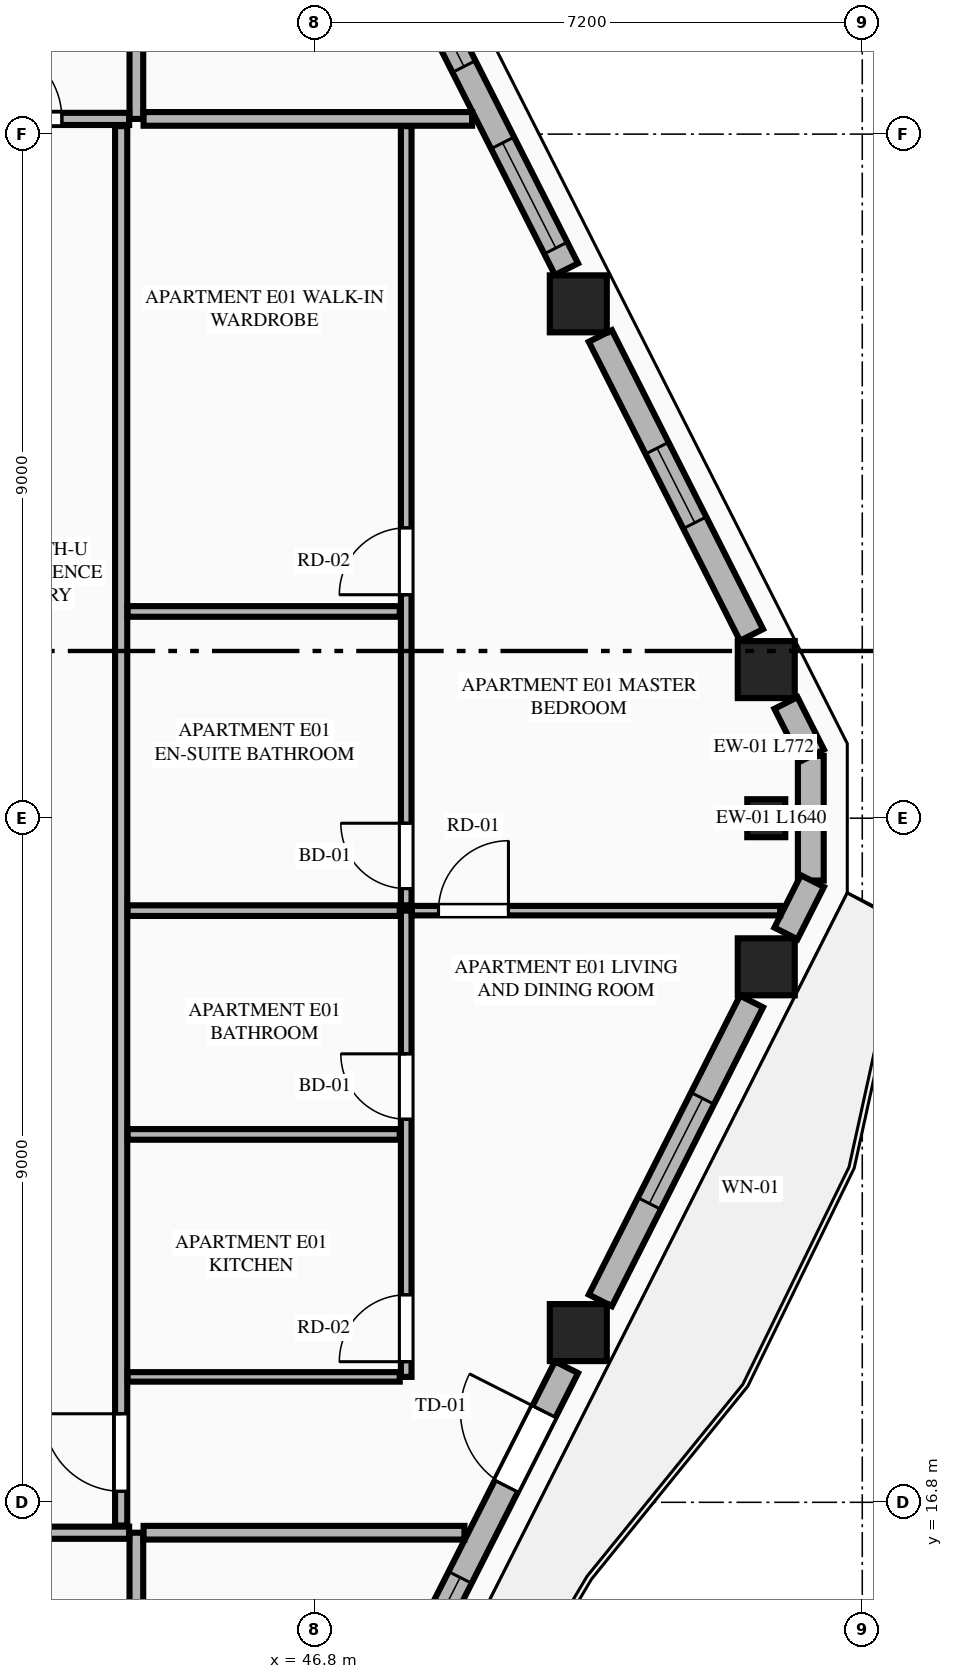
"""IFC4 building model, lengths in metres.
Left out: names, types, materials, properties, quantities, classifications, styles, units other than length and angle.
Written with IfcOpenShell. Run it as: python <this file> out.ifc"""

import sys

from ifc_helpers import new_model, si_unit, direction, frame, frame_2d, origin, origin_2d, place, context, subcontext, project, spatial, rectangle, extrude, element, fill, save


model = new_model("IFC4")
c1 = context("Model", 3, precision=1e-05, world=origin(), true_north=direction((0.0, 1.0)))
c2 = subcontext(c1, "Body", "Model", "MODEL_VIEW")
j1 = project(units=[si_unit("LENGTHUNIT", "METRE"), si_unit("PLANEANGLEUNIT", "RADIAN")], contexts=[c1])
p1 = place(None, origin())
s1 = spatial("IfcSite", under=j1, at=p1, CompositionType="ELEMENT")
p2 = place(p1, origin())
s2 = spatial("IfcBuilding", under=s1, at=p2, CompositionType="ELEMENT")
p3 = place(p2, frame((0.0, 0.0, 230.65)))
s3 = spatial("IfcBuildingStorey", under=s2, at=p3, CompositionType="ELEMENT", Elevation=230.65)
for number, where, z_axis, x_axis in (
    (1, (50.264, 19.033, 0.0), (0.0, 0.0, 1.0), (1.0, 0.0, 0.0)),
    (2, (52.737, 23.845, 0.0), (0.0, 0.0, 1.0), (1.0, 0.0, 0.0)),
    (3, (52.737, 27.755, 0.0), (0.0, 0.0, 1.0), (1.0, 0.0, 0.0)),
    (4, (50.264, 32.567, 0.0), (0.0, 0.0, 1.0), (1.0, 0.0, 0.0)),
):
    element("IfcColumn", number, at=place(p3, frame(where, z_axis=z_axis, x_axis=x_axis)), inside=s3, PredefinedType="COLUMN", context=c2, shape_type="SweptSolid", body=[
        extrude(rectangle(XDim=0.75, YDim=0.75, at=origin_2d()), origin(), (0.0, 0.0, 1.0), 3.65),
    ])
p4 = place(p3, frame((52.737, 25.8, 0.0), z_axis=(0.0, 0.0, 1.0), x_axis=(0.0, 1.0, 0.0)))
e5 = element("IfcColumn", 5, at=p4, inside=s3, PredefinedType="PILASTER", context=c2, shape_type="SweptSolid", body=[
    extrude(rectangle(XDim=0.5, YDim=0.35, at=origin_2d()), origin(), (0.0, 0.0, 1.0), 3.65),
])
p5 = place(p3, frame((53.323, 24.98, 0.0), z_axis=(0.0, 0.0, 1.0), x_axis=(0.0, 1.0, 0.0)))
e6 = element("IfcWall", 6, at=p5, inside=s3, PredefinedType="STANDARD", context=c2, shape_type="SweptSolid", body=[
    extrude(rectangle(XDim=1.64, YDim=0.34, at=frame_2d((0.82, 0.0))), origin(), (0.0, 0.0, 1.0), 3.45),
])
p6 = place(p3, frame((48.032, 14.473, 0.0), z_axis=(0.0, 0.0, 1.0), x_axis=(0.451539564999, 0.892251097641, 0.0)))
e7 = element("IfcWall", 7, at=p6, inside=s3, PredefinedType="STANDARD", context=c2, shape_type="SweptSolid", body=[
    extrude(rectangle(XDim=4.6, YDim=0.34, at=frame_2d((2.3, 0.0))), origin(), (0.0, 0.0, 1.0), 2.983),
])
p7 = place(p6, frame((2.846, 0.0, 0.0)))
e8 = element("IfcOpeningElement", 8, at=p7, cuts=e7, PredefinedType="OPENING", context=c2, shape_type="SweptSolid", body=[
    extrude(rectangle(XDim=1.1, YDim=2.25, at=frame_2d((0.55, 1.125))), frame((0.0, 0.18, 0.0), z_axis=(0.0, -1.0, 0.0), x_axis=(1.0, 0.0, 0.0)), (0.0, 0.0, 1.0), 0.36),
])
p8 = place(p6, frame((0.4, 0.0, 0.75)))
e9 = element("IfcOpeningElement", 9, at=p8, cuts=e7, PredefinedType="OPENING", context=c2, shape_type="SweptSolid", body=[
    extrude(rectangle(XDim=1.1, YDim=2.0, at=frame_2d((0.55, 1.0))), frame((0.0, 0.18, 0.0), z_axis=(0.0, -1.0, 0.0), x_axis=(1.0, 0.0, 0.0)), (0.0, 0.0, 1.0), 0.36),
])
p9 = place(p3, frame((50.554, 19.456, 0.0), z_axis=(0.0, 0.0, 1.0), x_axis=(0.45130817501, 0.892368158984, 0.0)))
e10 = element("IfcWall", 10, at=p9, inside=s3, PredefinedType="STANDARD", context=c2, shape_type="SweptSolid", body=[
    extrude(rectangle(XDim=4.407, YDim=0.34, at=frame_2d((2.204, 0.0))), origin(), (0.0, 0.0, 1.0), 2.983),
])
p10 = place(p9, frame((1.429, 0.0, 0.75)))
e11 = element("IfcOpeningElement", 11, at=p10, cuts=e10, PredefinedType="OPENING", context=c2, shape_type="SweptSolid", body=[
    extrude(rectangle(XDim=1.55, YDim=2.05, at=frame_2d((0.775, 1.025))), frame((0.0, 0.18, 0.0), z_axis=(0.0, -1.0, 0.0), x_axis=(1.0, 0.0, 0.0)), (0.0, 0.0, 1.0), 0.36),
])
for number, where, z_axis, x_axis in (
    (12, (52.996, 24.284, 0.0), (0.0, 0.0, 1.0), (0.451, 0.893, 0.0)),
    (13, (53.344, 26.627, 0.0), (0.0, 0.0, 1.0), (-0.451, 0.893, 0.0)),
):
    element("IfcWall", number, at=place(p3, frame(where, z_axis=z_axis, x_axis=x_axis)), inside=s3, PredefinedType="STANDARD", context=c2, shape_type="SweptSolid", body=[
        extrude(rectangle(XDim=0.772, YDim=0.34, at=frame_2d((0.386, 0.0))), origin(), (0.0, 0.0, 1.0), 3.45),
    ])
p11 = place(p3, frame((52.543, 28.211, 0.0), z_axis=(0.0, 0.0, 1.0), x_axis=(-0.451285866323, 0.892379441077, 0.0)))
e14 = element("IfcWall", 14, at=p11, inside=s3, PredefinedType="STANDARD", context=c2, shape_type="SweptSolid", body=[
    extrude(rectangle(XDim=4.407, YDim=0.34, at=frame_2d((2.204, 0.0))), origin(), (0.0, 0.0, 1.0), 2.983),
])
p12 = place(p11, frame((1.654, 0.0, 0.75)))
e15 = element("IfcOpeningElement", 15, at=p12, cuts=e14, PredefinedType="OPENING", context=c2, shape_type="SweptSolid", body=[
    extrude(rectangle(XDim=1.1, YDim=2.0, at=frame_2d((0.55, 1.0))), frame((0.0, 0.18, 0.0), z_axis=(0.0, -1.0, 0.0), x_axis=(1.0, 0.0, 0.0)), (0.0, 0.0, 1.0), 0.36),
])
p13 = place(p3, frame((50.109, 33.023, 0.0), z_axis=(0.0, 0.0, 1.0), x_axis=(-0.451539564999, 0.892251097641, 0.0)))
e16 = element("IfcWall", 16, at=p13, inside=s3, PredefinedType="STANDARD", context=c2, shape_type="SweptSolid", body=[
    extrude(rectangle(XDim=4.6, YDim=0.34, at=frame_2d((2.3, 0.0))), origin(), (0.0, 0.0, 1.0), 2.983),
])
p14 = place(p13, frame((0.312, 0.0, 0.75)))
e17 = element("IfcOpeningElement", 17, at=p14, cuts=e16, PredefinedType="OPENING", context=c2, shape_type="SweptSolid", body=[
    extrude(rectangle(XDim=1.55, YDim=2.05, at=frame_2d((0.775, 1.025))), frame((0.0, 0.18, 0.0), z_axis=(0.0, -1.0, 0.0), x_axis=(1.0, 0.0, 0.0)), (0.0, 0.0, 1.0), 0.36),
])
p15 = place(p13, frame((2.988, 0.0, 0.75)))
e18 = element("IfcOpeningElement", 18, at=p15, cuts=e16, PredefinedType="OPENING", context=c2, shape_type="SweptSolid", body=[
    extrude(rectangle(XDim=1.1, YDim=2.0, at=frame_2d((0.55, 1.0))), frame((0.0, 0.18, 0.0), z_axis=(0.0, -1.0, 0.0), x_axis=(1.0, 0.0, 0.0)), (0.0, 0.0, 1.0), 0.36),
])
p16 = place(p3, frame((44.45, 8.119, 0.0), z_axis=(0.0, 0.0, 1.0), x_axis=(0.0, 1.0, 0.0)))
e19 = element("IfcWall", 19, at=p16, inside=s3, PredefinedType="PARTITIONING", context=c2, shape_type="SweptSolid", body=[
    extrude(rectangle(XDim=8.281, YDim=0.18, at=frame_2d((4.141, 0.0))), origin(), (0.0, 0.0, 1.0), 3.45),
])
p17 = place(p3, frame((29.241, 16.4, 0.0), z_axis=(0.0, 0.0, 1.0), x_axis=(1.0, 0.0, 0.0)))
e20 = element("IfcWall", 20, at=p17, inside=s3, PredefinedType="PARTITIONING", context=c2, shape_type="SweptSolid", body=[
    extrude(rectangle(XDim=15.114, YDim=0.16, at=frame_2d((7.557, 0.0))), origin(), (0.0, 0.0, 1.0), 3.45),
])
p18 = place(p17, frame((12.909, 0.0, 0.0)))
e21 = element("IfcOpeningElement", 21, at=p18, cuts=e20, PredefinedType="OPENING", context=c2, shape_type="SweptSolid", body=[
    extrude(rectangle(XDim=1.02, YDim=2.25, at=frame_2d((0.51, 1.125))), frame((0.0, 0.09, 0.0), z_axis=(0.0, -1.0, 0.0), x_axis=(1.0, 0.0, 0.0)), (0.0, 0.0, 1.0), 0.18),
])
p19 = place(p3, frame((44.45, 35.0, 0.0), z_axis=(0.0, 0.0, 1.0), x_axis=(0.0, 1.0, 0.0)))
e22 = element("IfcWall", 22, at=p19, inside=s3, PredefinedType="PARTITIONING", context=c2, shape_type="SweptSolid", body=[
    extrude(rectangle(XDim=8.481, YDim=0.18, at=frame_2d((4.24, 0.0))), origin(), (0.0, 0.0, 1.0), 3.45),
])
p20 = place(p3, frame((29.241, 35.0, 0.0), z_axis=(0.0, 0.0, 1.0), x_axis=(1.0, 0.0, 0.0)))
e23 = element("IfcWall", 23, at=p20, inside=s3, PredefinedType="PARTITIONING", context=c2, shape_type="SweptSolid", body=[
    extrude(rectangle(XDim=15.114, YDim=0.16, at=frame_2d((7.557, 0.0))), origin(), (0.0, 0.0, 1.0), 3.45),
])
p21 = place(p20, frame((13.209, 0.0, 0.0)))
e24 = element("IfcOpeningElement", 24, at=p21, cuts=e23, PredefinedType="OPENING", context=c2, shape_type="SweptSolid", body=[
    extrude(rectangle(XDim=1.02, YDim=2.25, at=frame_2d((0.51, 1.125))), frame((0.0, 0.09, 0.0), z_axis=(0.0, -1.0, 0.0), x_axis=(1.0, 0.0, 0.0)), (0.0, 0.0, 1.0), 0.18),
])
p22 = place(p3, frame((44.545, 16.4, 0.0), z_axis=(0.0, 0.0, 1.0), x_axis=(1.0, 0.0, 0.0)))
e25 = element("IfcWall", 25, at=p22, inside=s3, PredefinedType="PARTITIONING", context=c2, shape_type="SweptSolid", body=[
    extrude(rectangle(XDim=4.221, YDim=0.18, at=frame_2d((2.111, 0.0))), origin(), (0.0, 0.0, 1.0), 3.45),
])
p23 = place(p3, frame((44.545, 35.0, 0.0), z_axis=(0.0, 0.0, 1.0), x_axis=(1.0, 0.0, 0.0)))
e26 = element("IfcWall", 26, at=p23, inside=s3, PredefinedType="PARTITIONING", context=c2, shape_type="SweptSolid", body=[
    extrude(rectangle(XDim=4.322, YDim=0.18, at=frame_2d((2.161, 0.0))), origin(), (0.0, 0.0, 1.0), 3.45),
])
p24 = place(p3, frame((44.25, 16.495, 0.0), z_axis=(0.0, 0.0, 1.0), x_axis=(0.0, 1.0, 0.0)))
e27 = element("IfcWall", 27, at=p24, inside=s3, PredefinedType="PARTITIONING", context=c2, shape_type="SweptSolid", body=[
    extrude(rectangle(XDim=18.41, YDim=0.16, at=frame_2d((9.205, 0.0))), origin(), (0.0, 0.0, 1.0), 3.137),
])
p25 = place(p24, frame((0.45, 0.0, 0.0)))
e28 = element("IfcOpeningElement", 28, at=p25, cuts=e27, PredefinedType="OPENING", context=c2, shape_type="SweptSolid", body=[
    extrude(rectangle(XDim=1.02, YDim=2.25, at=frame_2d((0.51, 1.125))), frame((0.0, 0.09, 0.0), z_axis=(0.0, -1.0, 0.0), x_axis=(1.0, 0.0, 0.0)), (0.0, 0.0, 1.0), 0.18),
])
p26 = place(p3, frame((44.335, 18.45, 0.0), z_axis=(0.0, 0.0, 1.0), x_axis=(1.0, 0.0, 0.0)))
e29 = element("IfcWall", 29, at=p26, inside=s3, PredefinedType="PARTITIONING", context=c2, shape_type="SweptSolid", body=[
    extrude(rectangle(XDim=3.58, YDim=0.125, at=frame_2d((1.79, 0.0))), origin(), (0.0, 0.0, 1.0), 3.45),
])
p27 = place(p3, frame((48.0, 18.45, 0.0), z_axis=(0.0, 0.0, 1.0), x_axis=(0.0, 1.0, 0.0)))
e30 = element("IfcWall", 30, at=p27, inside=s3, PredefinedType="PLUMBINGWALL", context=c2, shape_type="SweptSolid", body=[
    extrude(rectangle(XDim=6.134, YDim=0.14, at=frame_2d((3.067, 0.0))), origin(), (0.0, 0.0, 1.0), 3.45),
])
p28 = place(p27, frame((0.2, 0.0, 0.0)))
e31 = element("IfcOpeningElement", 31, at=p28, cuts=e30, PredefinedType="OPENING", context=c2, shape_type="SweptSolid", body=[
    extrude(rectangle(XDim=0.88, YDim=2.15, at=frame_2d((0.44, 1.075))), frame((0.0, 0.08, 0.0), z_axis=(0.0, -1.0, 0.0), x_axis=(1.0, 0.0, 0.0)), (0.0, 0.0, 1.0), 0.16),
])
p29 = place(p27, frame((3.39, 0.0, 0.0)))
e32 = element("IfcOpeningElement", 32, at=p29, cuts=e30, PredefinedType="OPENING", context=c2, shape_type="SweptSolid", body=[
    extrude(rectangle(XDim=0.86, YDim=2.1, at=frame_2d((0.43, 1.05))), frame((0.0, 0.08, 0.0), z_axis=(0.0, -1.0, 0.0), x_axis=(1.0, 0.0, 0.0)), (0.0, 0.0, 1.0), 0.16),
])
p30 = place(p3, frame((48.0, 24.654, 0.0), z_axis=(0.0, 0.0, 1.0), x_axis=(0.0, 1.0, 0.0)))
e33 = element("IfcWall", 33, at=p30, inside=s3, PredefinedType="PLUMBINGWALL", context=c2, shape_type="SweptSolid", body=[
    extrude(rectangle(XDim=10.251, YDim=0.14, at=frame_2d((5.125, 0.0))), origin(), (0.0, 0.0, 1.0), 3.45),
])
p31 = place(p30, frame((0.22, 0.0, 0.0)))
e34 = element("IfcOpeningElement", 34, at=p31, cuts=e33, PredefinedType="OPENING", context=c2, shape_type="SweptSolid", body=[
    extrude(rectangle(XDim=0.86, YDim=2.1, at=frame_2d((0.43, 1.05))), frame((0.0, 0.08, 0.0), z_axis=(0.0, -1.0, 0.0), x_axis=(1.0, 0.0, 0.0)), (0.0, 0.0, 1.0), 0.16),
])
p32 = place(p30, frame((4.086, 0.0, 0.0)))
e35 = element("IfcOpeningElement", 35, at=p32, cuts=e33, PredefinedType="OPENING", context=c2, shape_type="SweptSolid", body=[
    extrude(rectangle(XDim=0.88, YDim=2.15, at=frame_2d((0.44, 1.075))), frame((0.0, 0.08, 0.0), z_axis=(0.0, -1.0, 0.0), x_axis=(1.0, 0.0, 0.0)), (0.0, 0.0, 1.0), 0.16),
])
p33 = place(p3, frame((44.335, 24.584, 0.0), z_axis=(0.0, 0.0, 1.0), x_axis=(1.0, 0.0, 0.0)))
e36 = element("IfcWall", 36, at=p33, inside=s3, PredefinedType="PLUMBINGWALL", context=c2, shape_type="SweptSolid", body=[
    extrude(rectangle(XDim=3.58, YDim=0.14, at=frame_2d((1.79, 0.0))), origin(), (0.0, 0.0, 1.0), 3.45),
])
p34 = place(p3, frame((48.075, 24.584, 0.0), z_axis=(0.0, 0.0, 1.0), x_axis=(1.0, 0.0, 0.0)))
e37 = element("IfcWall", 37, at=p34, inside=s3, PredefinedType="PARTITIONING", context=c2, shape_type="SweptSolid", body=[
    extrude(rectangle(XDim=4.845, YDim=0.125, at=frame_2d((2.422, 0.0))), origin(), (0.0, 0.0, 1.0), 3.45),
])
p35 = place(p34, frame((0.35, 0.0, 0.0)))
e38 = element("IfcOpeningElement", 38, at=p35, cuts=e37, PredefinedType="OPENING", context=c2, shape_type="SweptSolid", body=[
    extrude(rectangle(XDim=0.92, YDim=2.15, at=frame_2d((0.46, 1.075))), frame((0.0, 0.073, 0.0), z_axis=(0.0, -1.0, 0.0), x_axis=(1.0, 0.0, 0.0)), (0.0, 0.0, 1.0), 0.145),
])
for number, where, z_axis, x_axis in (
    (39, (44.335, 21.64, 0.0), (0.0, 0.0, 1.0), (1.0, 0.0, 0.0)),
    (40, (44.335, 28.52, 0.0), (0.0, 0.0, 1.0), (1.0, 0.0, 0.0)),
):
    element("IfcWall", number, at=place(p3, frame(where, z_axis=z_axis, x_axis=x_axis)), inside=s3, PredefinedType="PLUMBINGWALL", context=c2, shape_type="SweptSolid", body=[
        extrude(rectangle(XDim=3.58, YDim=0.14, at=frame_2d((1.79, 0.0))), origin(), (0.0, 0.0, 1.0), 3.45),
    ])
p36 = place(p7, origin())
e41 = element("IfcDoor", 41, at=p36, inside=s3, OperationType="SINGLE_SWING_RIGHT", PredefinedType="DOOR", context=c2, shape_type="SweptSolid", body=[
    extrude(rectangle(XDim=1.1, YDim=2.25, at=frame_2d((0.55, 1.125))), frame((0.0, 0.025, 0.0), z_axis=(0.0, -1.0, 0.0), x_axis=(1.0, 0.0, 0.0)), (0.0, 0.0, 1.0), 0.05),
])
fill(e8, e41)
p37 = place(p10, origin())
e42 = element("IfcWindow", 42, at=p37, inside=s3, PartitioningType="SINGLE_PANEL", PredefinedType="WINDOW", context=c2, shape_type="SweptSolid", body=[
    extrude(rectangle(XDim=1.55, YDim=2.05, at=frame_2d((0.775, 1.025))), frame((0.0, 0.03, 0.0), z_axis=(0.0, -1.0, 0.0), x_axis=(1.0, 0.0, 0.0)), (0.0, 0.0, 1.0), 0.06),
])
fill(e11, e42)
p38 = place(p12, origin())
e43 = element("IfcWindow", 43, at=p38, inside=s3, PartitioningType="SINGLE_PANEL", PredefinedType="WINDOW", context=c2, shape_type="SweptSolid", body=[
    extrude(rectangle(XDim=1.1, YDim=2.0, at=frame_2d((0.55, 1.0))), frame((0.0, 0.03, 0.0), z_axis=(0.0, -1.0, 0.0), x_axis=(1.0, 0.0, 0.0)), (0.0, 0.0, 1.0), 0.06),
])
fill(e15, e43)
p39 = place(p14, origin())
e44 = element("IfcWindow", 44, at=p39, inside=s3, PartitioningType="SINGLE_PANEL", PredefinedType="WINDOW", context=c2, shape_type="SweptSolid", body=[
    extrude(rectangle(XDim=1.55, YDim=2.05, at=frame_2d((0.775, 1.025))), frame((0.0, 0.03, 0.0), z_axis=(0.0, -1.0, 0.0), x_axis=(1.0, 0.0, 0.0)), (0.0, 0.0, 1.0), 0.06),
])
fill(e17, e44)
p40 = place(p21, origin())
e45 = element("IfcDoor", 45, at=p40, inside=s3, OperationType="SINGLE_SWING_LEFT", PredefinedType="DOOR", context=c2, shape_type="SweptSolid", body=[
    extrude(rectangle(XDim=1.02, YDim=2.25, at=frame_2d((0.51, 1.125))), frame((0.0, 0.025, 0.0), z_axis=(0.0, -1.0, 0.0), x_axis=(1.0, 0.0, 0.0)), (0.0, 0.0, 1.0), 0.05),
])
fill(e24, e45)
p41 = place(p28, origin())
e46 = element("IfcDoor", 46, at=p41, inside=s3, OperationType="SINGLE_SWING_LEFT", PredefinedType="DOOR", context=c2, shape_type="SweptSolid", body=[
    extrude(rectangle(XDim=0.88, YDim=2.15, at=frame_2d((0.44, 1.075))), frame((0.0, 0.025, 0.0), z_axis=(0.0, -1.0, 0.0), x_axis=(1.0, 0.0, 0.0)), (0.0, 0.0, 1.0), 0.05),
])
fill(e31, e46)
p42 = place(p29, origin())
e47 = element("IfcDoor", 47, at=p42, inside=s3, OperationType="SINGLE_SWING_RIGHT", PredefinedType="DOOR", context=c2, shape_type="SweptSolid", body=[
    extrude(rectangle(XDim=0.86, YDim=2.1, at=frame_2d((0.43, 1.05))), frame((0.0, 0.025, 0.0), z_axis=(0.0, -1.0, 0.0), x_axis=(1.0, 0.0, 0.0)), (0.0, 0.0, 1.0), 0.05),
])
fill(e32, e47)
p43 = place(p31, origin())
e48 = element("IfcDoor", 48, at=p43, inside=s3, OperationType="SINGLE_SWING_RIGHT", PredefinedType="DOOR", context=c2, shape_type="SweptSolid", body=[
    extrude(rectangle(XDim=0.86, YDim=2.1, at=frame_2d((0.43, 1.05))), frame((0.0, 0.025, 0.0), z_axis=(0.0, -1.0, 0.0), x_axis=(1.0, 0.0, 0.0)), (0.0, 0.0, 1.0), 0.05),
])
fill(e34, e48)
p44 = place(p32, origin())
e49 = element("IfcDoor", 49, at=p44, inside=s3, OperationType="SINGLE_SWING_LEFT", PredefinedType="DOOR", context=c2, shape_type="SweptSolid", body=[
    extrude(rectangle(XDim=0.88, YDim=2.15, at=frame_2d((0.44, 1.075))), frame((0.0, 0.025, 0.0), z_axis=(0.0, -1.0, 0.0), x_axis=(1.0, 0.0, 0.0)), (0.0, 0.0, 1.0), 0.05),
])
fill(e35, e49)
p45 = place(p25, origin())
e50 = element("IfcDoor", 50, at=p45, inside=s3, OperationType="SINGLE_SWING_RIGHT", PredefinedType="DOOR", context=c2, shape_type="SweptSolid", body=[
    extrude(rectangle(XDim=1.02, YDim=2.25, at=frame_2d((0.51, 1.125))), frame((0.0, 0.025, 0.0), z_axis=(0.0, -1.0, 0.0), x_axis=(1.0, 0.0, 0.0)), (0.0, 0.0, 1.0), 0.05),
])
fill(e28, e50)
p46 = place(p35, origin())
e51 = element("IfcDoor", 51, at=p46, inside=s3, OperationType="SINGLE_SWING_RIGHT", PredefinedType="DOOR", context=c2, shape_type="SweptSolid", body=[
    extrude(rectangle(XDim=0.92, YDim=2.15, at=frame_2d((0.46, 1.075))), frame((0.0, 0.025, 0.0), z_axis=(0.0, -1.0, 0.0), x_axis=(1.0, 0.0, 0.0)), (0.0, 0.0, 1.0), 0.05),
])
fill(e38, e51)
p47 = place(p8, origin())
e52 = element("IfcWindow", 52, at=p47, inside=s3, PartitioningType="SINGLE_PANEL", PredefinedType="WINDOW", context=c2, shape_type="SweptSolid", body=[
    extrude(rectangle(XDim=1.1, YDim=2.0, at=frame_2d((0.55, 1.0))), frame((0.0, 0.03, 0.0), z_axis=(0.0, -1.0, 0.0), x_axis=(1.0, 0.0, 0.0)), (0.0, 0.0, 1.0), 0.06),
])
fill(e9, e52)
p48 = place(p15, origin())
e53 = element("IfcWindow", 53, at=p48, inside=s3, PartitioningType="SINGLE_PANEL", PredefinedType="WINDOW", context=c2, shape_type="SweptSolid", body=[
    extrude(rectangle(XDim=1.1, YDim=2.0, at=frame_2d((0.55, 1.0))), frame((0.0, 0.03, 0.0), z_axis=(0.0, -1.0, 0.0), x_axis=(1.0, 0.0, 0.0)), (0.0, 0.0, 1.0), 0.06),
])
fill(e18, e53)
save(model, sys.argv[1])
